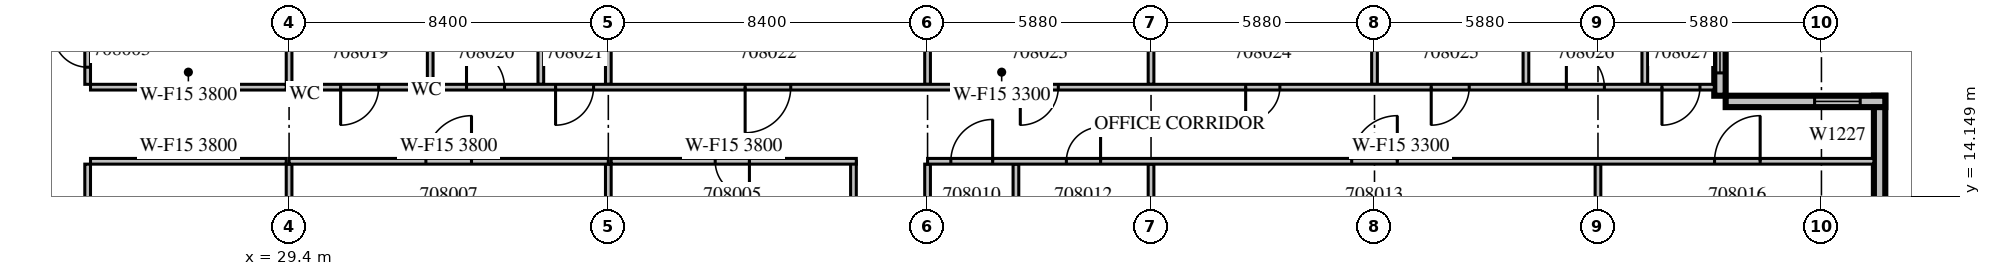
"""IFC4 building model, lengths in metres.
Left out: names, types, materials, properties, quantities, classifications, styles, units other than length and angle.
Written with IfcOpenShell. Run it as: python <this file> out.ifc"""

import sys

from ifc_helpers import new_model, si_unit, direction, frame, frame_2d, origin, place, context, subcontext, project, spatial, rectangle, extrude, source, transform, mapped, element, fill, save


model = new_model("IFC4")
c1 = context("Model", 3, precision=1e-05, world=origin(), true_north=direction((0.0, 1.0)))
c2 = subcontext(c1, "Body", "Model", "MODEL_VIEW")
j1 = project(units=[si_unit("LENGTHUNIT", "METRE"), si_unit("PLANEANGLEUNIT", "RADIAN")], contexts=[c1])
p1 = place(None, origin())
s1 = spatial("IfcSite", under=j1, at=p1, CompositionType="ELEMENT")
p2 = place(p1, origin())
s2 = spatial("IfcBuilding", under=s1, at=p2, CompositionType="ELEMENT")
p3 = place(p2, frame((0.0, 0.0, 44.7)))
s3 = spatial("IfcBuildingStorey", under=s2, at=p3, CompositionType="ELEMENT", Elevation=44.7)
m1 = source(origin(), c2, "Body", "SweptSolid", [
    extrude(rectangle(XDim=6.3, YDim=0.3, at=frame_2d((3.15, 0.0))), origin(), (0.0, 0.0, 1.0), 3.8),
])
p4 = place(p3, frame((71.25, 10.5, 0.0), z_axis=(0.0, 0.0, 1.0), x_axis=(0.0, 1.0, 0.0)))
e1 = element("IfcWall", 1, at=p4, inside=s3, PredefinedType="STANDARD", context=c2, shape_type="MappedRepresentation", body=[
    mapped(m1, transform((0.0, 0.0, 0.0), scale=1.0)),
])
m2 = source(origin(), c2, "Body", "SweptSolid", [
    extrude(rectangle(XDim=1.2, YDim=2.7, at=frame_2d((0.6, 1.35))), frame((0.0, 0.16, 0.0), z_axis=(0.0, -1.0, 0.0), x_axis=(1.0, 0.0, 0.0)), (0.0, 0.0, 1.0), 0.32),
])
p5 = place(p4, frame((1.062, 0.0, 0.6)))
e2 = element("IfcOpeningElement", 2, at=p5, cuts=e1, PredefinedType="OPENING", context=c2, shape_type="MappedRepresentation", body=[
    mapped(m2, transform((0.0, 0.0, 0.0), scale=1.0)),
])
m3 = source(origin(), c2, "Body", "SweptSolid", [
    extrude(rectangle(XDim=4.2, YDim=0.3, at=frame_2d((2.1, 0.0))), origin(), (0.0, 0.0, 1.0), 3.8),
])
p6 = place(p3, frame((71.4, 16.65, 0.0), z_axis=(0.0, 0.0, 1.0), x_axis=(-1.0, 0.0, 0.0)))
e3 = element("IfcWall", 3, at=p6, inside=s3, PredefinedType="STANDARD", context=c2, shape_type="MappedRepresentation", body=[
    mapped(m3, transform((0.0, 0.0, 0.0), scale=1.0)),
])
p7 = place(p6, frame((0.66, 0.0, 0.6)))
e4 = element("IfcOpeningElement", 4, at=p7, cuts=e3, PredefinedType="OPENING", context=c2, shape_type="MappedRepresentation", body=[
    mapped(m2, transform((0.0, 0.0, 0.0), scale=1.0)),
])
p8 = place(p3, frame((67.05, 16.8, 0.0), z_axis=(0.0, 0.0, 1.0), x_axis=(0.0, 1.0, 0.0)))
e5 = element("IfcWall", 5, at=p8, inside=s3, PredefinedType="STANDARD", context=c2, shape_type="MappedRepresentation", body=[
    mapped(m3, transform((0.0, 0.0, 0.0), scale=1.0)),
])
m4 = source(origin(), c2, "Body", "SweptSolid", [
    extrude(rectangle(XDim=3.0, YDim=2.7, at=frame_2d((1.5, 1.35))), frame((0.0, 0.16, 0.0), z_axis=(0.0, -1.0, 0.0), x_axis=(1.0, 0.0, 0.0)), (0.0, 0.0, 1.0), 0.32),
])
p9 = place(p8, frame((0.6, 0.0, 0.6)))
e6 = element("IfcOpeningElement", 6, at=p9, cuts=e5, PredefinedType="OPENING", context=c2, shape_type="MappedRepresentation", body=[
    mapped(m4, transform((0.0, 0.0, 0.0), scale=1.0)),
])
m5 = source(origin(), c2, "Body", "SweptSolid", [
    extrude(rectangle(XDim=11.925, YDim=0.15, at=frame_2d((5.963, 0.0))), origin(), (0.0, 0.0, 1.0), 3.8),
])
p10 = place(p3, frame((24.1, 15.0, 0.0), z_axis=(0.0, 0.0, 1.0), x_axis=(0.0, -1.0, 0.0)))
e7 = element("IfcWall", 7, at=p10, inside=s3, PredefinedType="PARTITIONING", context=c2, shape_type="MappedRepresentation", body=[
    mapped(m5, transform((0.0, 0.0, 0.0), scale=1.0)),
])
m6 = source(origin(), c2, "Body", "SweptSolid", [
    extrude(rectangle(XDim=0.9, YDim=2.1, at=frame_2d((0.45, 1.05))), frame((0.0, 0.085, 0.0), z_axis=(0.0, -1.0, 0.0), x_axis=(1.0, 0.0, 0.0)), (0.0, 0.0, 1.0), 0.17),
])
p11 = place(p10, frame((9.562, 0.0, 0.0)))
e8 = element("IfcOpeningElement", 8, at=p11, cuts=e7, PredefinedType="OPENING", context=c2, shape_type="MappedRepresentation", body=[
    mapped(m6, transform((0.0, 0.0, 0.0), scale=1.0)),
])
p12 = place(p10, frame((2.725, 0.0, 0.0)))
e9 = element("IfcOpeningElement", 9, at=p12, cuts=e7, PredefinedType="OPENING", context=c2, shape_type="MappedRepresentation", body=[
    mapped(m6, transform((0.0, 0.0, 0.0), scale=1.0)),
])
m7 = source(origin(), c2, "Body", "SweptSolid", [
    extrude(rectangle(XDim=3.6, YDim=0.15, at=frame_2d((1.8, 0.0))), origin(), (0.0, 0.0, 1.0), 3.8),
])
p13 = place(p3, frame((24.1, 20.7, 0.0), z_axis=(0.0, 0.0, 1.0), x_axis=(0.0, -1.0, 0.0)))
e10 = element("IfcWall", 10, at=p13, inside=s3, PredefinedType="PARTITIONING", context=c2, shape_type="MappedRepresentation", body=[
    mapped(m7, transform((0.0, 0.0, 0.0), scale=1.0)),
])
p14 = place(p13, frame((2.25, 0.0, 0.0)))
e11 = element("IfcOpeningElement", 11, at=p14, cuts=e10, PredefinedType="OPENING", context=c2, shape_type="MappedRepresentation", body=[
    mapped(m6, transform((0.0, 0.0, 0.0), scale=1.0)),
])
m8 = source(origin(), c2, "Body", "SweptSolid", [
    extrude(rectangle(XDim=5.15, YDim=0.15, at=frame_2d((2.575, 0.0))), origin(), (0.0, 0.0, 1.0), 3.8),
])
for number, where, z_axis, x_axis in (
    (12, (29.325, 15.075, 0.0), (0.0, 0.0, 1.0), (-1.0, 0.0, 0.0)),
    (13, (24.175, 17.025, 0.0), (0.0, 0.0, 1.0), (1.0, 0.0, 0.0)),
):
    element("IfcWall", number, at=place(p3, frame(where, z_axis=z_axis, x_axis=x_axis)), inside=s3, PredefinedType="PARTITIONING", context=c2, shape_type="MappedRepresentation", body=[
        mapped(m8, transform((0.0, 0.0, 0.0), scale=1.0)),
    ])
m9 = source(origin(), c2, "Body", "SweptSolid", [
    extrude(rectangle(XDim=3.901, YDim=0.15, at=frame_2d((1.95, 0.0))), origin(), (0.0, 0.0, 1.0), 3.8),
])
p15 = place(p3, frame((29.4, 11.099, 0.0), z_axis=(0.0, 0.0, 1.0), x_axis=(0.0, 1.0, 0.0)))
e14 = element("IfcWall", 14, at=p15, inside=s3, PredefinedType="PARTITIONING", context=c2, shape_type="MappedRepresentation", body=[
    mapped(m9, transform((0.0, 0.0, 0.0), scale=1.0)),
])
m10 = source(origin(), c2, "Body", "SweptSolid", [
    extrude(rectangle(XDim=2.701, YDim=0.15, at=frame_2d((1.351, 0.0))), origin(), (0.0, 0.0, 1.0), 3.8),
])
p16 = place(p3, frame((29.4, 17.1, 0.0), z_axis=(0.0, 0.0, 1.0), x_axis=(0.0, 1.0, 0.0)))
e15 = element("IfcWall", 15, at=p16, inside=s3, PredefinedType="PARTITIONING", context=c2, shape_type="MappedRepresentation", body=[
    mapped(m10, transform((0.0, 0.0, 0.0), scale=1.0)),
])
m11 = source(origin(), c2, "Body", "SweptSolid", [
    extrude(rectangle(XDim=3.975, YDim=0.15, at=frame_2d((1.988, 0.0))), origin(), (0.0, 0.0, 1.0), 3.8),
])
p17 = place(p3, frame((44.25, 11.1, 0.0), z_axis=(0.0, 0.0, 1.0), x_axis=(0.0, 1.0, 0.0)))
e16 = element("IfcWall", 16, at=p17, inside=s3, PredefinedType="PARTITIONING", context=c2, shape_type="MappedRepresentation", body=[
    mapped(m11, transform((0.0, 0.0, 0.0), scale=1.0)),
])
m12 = source(origin(), c2, "Body", "SweptSolid", [
    extrude(rectangle(XDim=6.45, YDim=0.15, at=frame_2d((3.225, 0.0))), origin(), (0.0, 0.0, 1.0), 3.8),
])
p18 = place(p3, frame((44.325, 15.075, 0.0), z_axis=(0.0, 0.0, 1.0), x_axis=(-1.0, 0.0, 0.0)))
e17 = element("IfcWall", 17, at=p18, inside=s3, PredefinedType="PARTITIONING", context=c2, shape_type="MappedRepresentation", body=[
    mapped(m12, transform((0.0, 0.0, 0.0), scale=1.0)),
])
p19 = place(p18, frame((2.812, 0.0, 0.0)))
e18 = element("IfcOpeningElement", 18, at=p19, cuts=e17, PredefinedType="OPENING", context=c2, shape_type="MappedRepresentation", body=[
    mapped(m6, transform((0.0, 0.0, 0.0), scale=1.0)),
])
m13 = source(origin(), c2, "Body", "SweptSolid", [
    extrude(rectangle(XDim=3.75, YDim=0.15, at=frame_2d((1.875, 0.0))), origin(), (0.0, 0.0, 1.0), 3.8),
])
for number, where, z_axis, x_axis in (
    (19, (37.8, 11.25, 0.0), (0.0, 0.0, 1.0), (0.0, 1.0, 0.0)),
    (20, (48.525, 11.25, 0.0), (0.0, 0.0, 1.0), (0.0, 1.0, 0.0)),
    (21, (46.2, 11.25, 0.0), (0.0, 0.0, 1.0), (0.0, 1.0, 0.0)),
    (22, (52.08, 11.25, 0.0), (0.0, 0.0, 1.0), (0.0, 1.0, 0.0)),
    (23, (63.84, 11.25, 0.0), (0.0, 0.0, 1.0), (0.0, 1.0, 0.0)),
):
    element("IfcWall", number, at=place(p3, frame(where, z_axis=z_axis, x_axis=x_axis)), inside=s3, PredefinedType="PARTITIONING", context=c2, shape_type="MappedRepresentation", body=[
        mapped(m13, transform((0.0, 0.0, 0.0), scale=1.0)),
    ])
for number, where, z_axis, x_axis in (
    (24, (33.113, 20.7, 0.0), (0.0, 0.0, 1.0), (0.0, -1.0, 0.0)),
    (25, (36.024, 20.7, 0.0), (0.0, 0.0, 1.0), (0.0, -1.0, 0.0)),
    (26, (61.944, 20.7, 0.0), (0.0, 0.0, 1.0), (0.0, -1.0, 0.0)),
    (27, (65.072, 20.7, 0.0), (0.0, 0.0, 1.0), (0.0, -1.0, 0.0)),
):
    element("IfcWall", number, at=place(p3, frame(where, z_axis=z_axis, x_axis=x_axis)), inside=s3, PredefinedType="PARTITIONING", context=c2, shape_type="MappedRepresentation", body=[
        mapped(m7, transform((0.0, 0.0, 0.0), scale=1.0)),
    ])
for number, where, z_axis, x_axis in (
    (28, (37.8, 17.1, 0.0), (0.0, 0.0, 1.0), (0.0, 1.0, 0.0)),
    (29, (46.2, 17.1, 0.0), (0.0, 0.0, 1.0), (0.0, 1.0, 0.0)),
    (30, (52.08, 17.1, 0.0), (0.0, 0.0, 1.0), (0.0, 1.0, 0.0)),
    (31, (57.96, 17.1, 0.0), (0.0, 0.0, 1.0), (0.0, 1.0, 0.0)),
):
    element("IfcWall", number, at=place(p3, frame(where, z_axis=z_axis, x_axis=x_axis)), inside=s3, PredefinedType="PARTITIONING", context=c2, shape_type="MappedRepresentation", body=[
        mapped(m10, transform((0.0, 0.0, 0.0), scale=1.0)),
    ])
m14 = source(origin(), c2, "Body", "SweptSolid", [
    extrude(rectangle(XDim=8.4, YDim=0.15, at=frame_2d((4.2, 0.0))), origin(), (0.0, 0.0, 1.0), 3.8),
])
p20 = place(p3, frame((37.8, 15.075, 0.0), z_axis=(0.0, 0.0, 1.0), x_axis=(-1.0, 0.0, 0.0)))
e32 = element("IfcWall", 32, at=p20, inside=s3, PredefinedType="PARTITIONING", context=c2, shape_type="MappedRepresentation", body=[
    mapped(m14, transform((0.0, 0.0, 0.0), scale=1.0)),
])
m15 = source(origin(), c2, "Body", "SweptSolid", [
    extrude(rectangle(XDim=1.2, YDim=2.1, at=frame_2d((0.6, 1.05))), frame((0.0, 0.085, 0.0), z_axis=(0.0, -1.0, 0.0), x_axis=(1.0, 0.0, 0.0)), (0.0, 0.0, 1.0), 0.17),
])
p21 = place(p20, frame((3.6, 0.0, 0.0)))
e33 = element("IfcOpeningElement", 33, at=p21, cuts=e32, PredefinedType="OPENING", context=c2, shape_type="MappedRepresentation", body=[
    mapped(m15, transform((0.0, 0.0, 0.0), scale=1.0)),
])
m16 = source(origin(), c2, "Body", "SweptSolid", [
    extrude(rectangle(XDim=24.9, YDim=0.15, at=frame_2d((12.45, 0.0))), origin(), (0.0, 0.0, 1.0), 3.3),
])
p22 = place(p3, frame((71.1, 15.075, 0.0), z_axis=(0.0, 0.0, 1.0), x_axis=(-1.0, 0.0, 0.0)))
e34 = element("IfcWall", 34, at=p22, inside=s3, PredefinedType="PARTITIONING", context=c2, shape_type="MappedRepresentation", body=[
    mapped(m16, transform((0.0, 0.0, 0.0), scale=1.0)),
])
m17 = source(origin(), c2, "Body", "SweptSolid", [
    extrude(rectangle(XDim=1.1, YDim=2.1, at=frame_2d((0.55, 1.05))), frame((0.0, 0.085, 0.0), z_axis=(0.0, -1.0, 0.0), x_axis=(1.0, 0.0, 0.0)), (0.0, 0.0, 1.0), 0.17),
])
p23 = place(p22, frame((23.188, 0.0, 0.0)))
e35 = element("IfcOpeningElement", 35, at=p23, cuts=e34, PredefinedType="OPENING", context=c2, shape_type="MappedRepresentation", body=[
    mapped(m17, transform((0.0, 0.0, 0.0), scale=1.0)),
])
p24 = place(p22, frame((20.348, 0.0, 0.0)))
e36 = element("IfcOpeningElement", 36, at=p24, cuts=e34, PredefinedType="OPENING", context=c2, shape_type="MappedRepresentation", body=[
    mapped(m6, transform((0.0, 0.0, 0.0), scale=1.0)),
])
p25 = place(p22, frame((12.54, 0.0, 0.0)))
e37 = element("IfcOpeningElement", 37, at=p25, cuts=e34, PredefinedType="OPENING", context=c2, shape_type="MappedRepresentation", body=[
    mapped(m15, transform((0.0, 0.0, 0.0), scale=1.0)),
])
p26 = place(p22, frame((2.993, 0.0, 0.0)))
e38 = element("IfcOpeningElement", 38, at=p26, cuts=e34, PredefinedType="OPENING", context=c2, shape_type="MappedRepresentation", body=[
    mapped(m15, transform((0.0, 0.0, 0.0), scale=1.0)),
])
p27 = place(p3, frame((29.4, 17.025, 0.0), z_axis=(0.0, 0.0, 1.0), x_axis=(1.0, 0.0, 0.0)))
e39 = element("IfcWall", 39, at=p27, inside=s3, PredefinedType="PARTITIONING", context=c2, shape_type="SweptSolid", body=[
    extrude(rectangle(XDim=37.5, YDim=0.15, at=frame_2d((18.75, 0.0))), origin(), (0.0, 0.0, 1.0), 3.3),
])
m18 = source(origin(), c2, "Body", "SweptSolid", [
    extrude(rectangle(XDim=1.0, YDim=2.1, at=frame_2d((0.5, 1.05))), frame((0.0, 0.085, 0.0), z_axis=(0.0, -1.0, 0.0), x_axis=(1.0, 0.0, 0.0)), (0.0, 0.0, 1.0), 0.17),
])
p28 = place(p27, frame((1.357, 0.0, 0.0)))
e40 = element("IfcOpeningElement", 40, at=p28, cuts=e39, PredefinedType="OPENING", context=c2, shape_type="MappedRepresentation", body=[
    mapped(m18, transform((0.0, 0.0, 0.0), scale=1.0)),
])
p29 = place(p27, frame((4.669, 0.0, 0.0)))
e41 = element("IfcOpeningElement", 41, at=p29, cuts=e39, PredefinedType="OPENING", context=c2, shape_type="MappedRepresentation", body=[
    mapped(m18, transform((0.0, 0.0, 0.0), scale=1.0)),
])
p30 = place(p27, frame((7.012, 0.0, 0.0)))
e42 = element("IfcOpeningElement", 42, at=p30, cuts=e39, PredefinedType="OPENING", context=c2, shape_type="MappedRepresentation", body=[
    mapped(m18, transform((0.0, 0.0, 0.0), scale=1.0)),
])
p31 = place(p27, frame((12.0, 0.0, 0.0)))
e43 = element("IfcOpeningElement", 43, at=p31, cuts=e39, PredefinedType="OPENING", context=c2, shape_type="MappedRepresentation", body=[
    mapped(m15, transform((0.0, 0.0, 0.0), scale=1.0)),
])
p32 = place(p27, frame((19.24, 0.0, 0.0)))
e44 = element("IfcOpeningElement", 44, at=p32, cuts=e39, PredefinedType="OPENING", context=c2, shape_type="MappedRepresentation", body=[
    mapped(m18, transform((0.0, 0.0, 0.0), scale=1.0)),
])
p33 = place(p27, frame((25.17, 0.0, 0.0)))
e45 = element("IfcOpeningElement", 45, at=p33, cuts=e39, PredefinedType="OPENING", context=c2, shape_type="MappedRepresentation", body=[
    mapped(m6, transform((0.0, 0.0, 0.0), scale=1.0)),
])
p34 = place(p27, frame((30.052, 0.0, 0.0)))
e46 = element("IfcOpeningElement", 46, at=p34, cuts=e39, PredefinedType="OPENING", context=c2, shape_type="MappedRepresentation", body=[
    mapped(m18, transform((0.0, 0.0, 0.0), scale=1.0)),
])
p35 = place(p27, frame((33.608, 0.0, 0.0)))
e47 = element("IfcOpeningElement", 47, at=p35, cuts=e39, PredefinedType="OPENING", context=c2, shape_type="MappedRepresentation", body=[
    mapped(m18, transform((0.0, 0.0, 0.0), scale=1.0)),
])
p36 = place(p27, frame((36.124, 0.0, 0.0)))
e48 = element("IfcOpeningElement", 48, at=p36, cuts=e39, PredefinedType="OPENING", context=c2, shape_type="MappedRepresentation", body=[
    mapped(m18, transform((0.0, 0.0, 0.0), scale=1.0)),
])
m19 = source(origin(), c2, "Body", "SweptSolid", [
    extrude(rectangle(XDim=1.2, YDim=2.7, at=frame_2d((0.6, 1.35))), frame((0.0, 0.03, 0.0), z_axis=(0.0, -1.0, 0.0), x_axis=(1.0, 0.0, 0.0)), (0.0, 0.0, 1.0), 0.06),
])
p37 = place(p7, origin())
e49 = element("IfcWindow", 49, at=p37, inside=s3, PartitioningType="SINGLE_PANEL", PredefinedType="WINDOW", context=c2, shape_type="MappedRepresentation", body=[
    mapped(m19, transform((0.0, 0.0, 0.0), scale=1.0)),
])
fill(e4, e49)
m20 = source(origin(), c2, "Body", "SweptSolid", [
    extrude(rectangle(XDim=3.0, YDim=2.7, at=frame_2d((1.5, 1.35))), frame((0.0, 0.03, 0.0), z_axis=(0.0, -1.0, 0.0), x_axis=(1.0, 0.0, 0.0)), (0.0, 0.0, 1.0), 0.06),
])
p38 = place(p9, origin())
e50 = element("IfcWindow", 50, at=p38, inside=s3, PartitioningType="SINGLE_PANEL", PredefinedType="WINDOW", context=c2, shape_type="MappedRepresentation", body=[
    mapped(m20, transform((0.0, 0.0, 0.0), scale=1.0)),
])
fill(e6, e50)
m21 = source(origin(), c2, "Body", "SweptSolid", [
    extrude(rectangle(XDim=0.9, YDim=2.1, at=frame_2d((0.45, 1.05))), frame((0.0, 0.025, 0.0), z_axis=(0.0, -1.0, 0.0), x_axis=(1.0, 0.0, 0.0)), (0.0, 0.0, 1.0), 0.05),
])
p39 = place(p14, origin())
e51 = element("IfcDoor", 51, at=p39, inside=s3, OperationType="SINGLE_SWING_RIGHT", PredefinedType="DOOR", context=c2, shape_type="MappedRepresentation", body=[
    mapped(m21, transform((0.0, 0.0, 0.0), scale=1.0)),
])
fill(e11, e51)
p40 = place(p19, origin())
e52 = element("IfcDoor", 52, at=p40, inside=s3, OperationType="SINGLE_SWING_LEFT", PredefinedType="DOOR", context=c2, shape_type="MappedRepresentation", body=[
    mapped(m21, transform((0.0, 0.0, 0.0), scale=1.0)),
])
fill(e18, e52)
m22 = source(origin(), c2, "Body", "SweptSolid", [
    extrude(rectangle(XDim=1.2, YDim=2.1, at=frame_2d((0.6, 1.05))), frame((0.0, 0.025, 0.0), z_axis=(0.0, -1.0, 0.0), x_axis=(1.0, 0.0, 0.0)), (0.0, 0.0, 1.0), 0.05),
])
p41 = place(p21, origin())
e53 = element("IfcDoor", 53, at=p41, inside=s3, OperationType="SINGLE_SWING_RIGHT", PredefinedType="DOOR", context=c2, shape_type="MappedRepresentation", body=[
    mapped(m22, transform((0.0, 0.0, 0.0), scale=1.0)),
])
fill(e33, e53)
m23 = source(origin(), c2, "Body", "SweptSolid", [
    extrude(rectangle(XDim=1.1, YDim=2.1, at=frame_2d((0.55, 1.05))), frame((0.0, 0.025, 0.0), z_axis=(0.0, -1.0, 0.0), x_axis=(1.0, 0.0, 0.0)), (0.0, 0.0, 1.0), 0.05),
])
p42 = place(p23, origin())
e54 = element("IfcDoor", 54, at=p42, inside=s3, OperationType="SINGLE_SWING_RIGHT", PredefinedType="DOOR", context=c2, shape_type="MappedRepresentation", body=[
    mapped(m23, transform((0.0, 0.0, 0.0), scale=1.0)),
])
fill(e35, e54)
p43 = place(p24, origin())
e55 = element("IfcDoor", 55, at=p43, inside=s3, OperationType="SINGLE_SWING_RIGHT", PredefinedType="DOOR", context=c2, shape_type="MappedRepresentation", body=[
    mapped(m21, transform((0.0, 0.0, 0.0), scale=1.0)),
])
fill(e36, e55)
p44 = place(p25, origin())
e56 = element("IfcDoor", 56, at=p44, inside=s3, OperationType="SINGLE_SWING_RIGHT", PredefinedType="DOOR", context=c2, shape_type="MappedRepresentation", body=[
    mapped(m22, transform((0.0, 0.0, 0.0), scale=1.0)),
])
fill(e37, e56)
p45 = place(p26, origin())
e57 = element("IfcDoor", 57, at=p45, inside=s3, OperationType="SINGLE_SWING_RIGHT", PredefinedType="DOOR", context=c2, shape_type="MappedRepresentation", body=[
    mapped(m22, transform((0.0, 0.0, 0.0), scale=1.0)),
])
fill(e38, e57)
m24 = source(origin(), c2, "Body", "SweptSolid", [
    extrude(rectangle(XDim=1.0, YDim=2.1, at=frame_2d((0.5, 1.05))), frame((0.0, 0.025, 0.0), z_axis=(0.0, -1.0, 0.0), x_axis=(1.0, 0.0, 0.0)), (0.0, 0.0, 1.0), 0.05),
])
p46 = place(p28, origin())
e58 = element("IfcDoor", 58, at=p46, inside=s3, OperationType="SINGLE_SWING_RIGHT", PredefinedType="DOOR", context=c2, shape_type="MappedRepresentation", body=[
    mapped(m24, transform((0.0, 0.0, 0.0), scale=1.0)),
])
fill(e40, e58)
p47 = place(p29, origin())
e59 = element("IfcDoor", 59, at=p47, inside=s3, OperationType="SINGLE_SWING_LEFT", PredefinedType="DOOR", context=c2, shape_type="MappedRepresentation", body=[
    mapped(m24, transform((0.0, 0.0, 0.0), scale=1.0)),
])
fill(e41, e59)
p48 = place(p30, origin())
e60 = element("IfcDoor", 60, at=p48, inside=s3, OperationType="SINGLE_SWING_RIGHT", PredefinedType="DOOR", context=c2, shape_type="MappedRepresentation", body=[
    mapped(m24, transform((0.0, 0.0, 0.0), scale=1.0)),
])
fill(e42, e60)
p49 = place(p31, origin())
e61 = element("IfcDoor", 61, at=p49, inside=s3, OperationType="SINGLE_SWING_RIGHT", PredefinedType="DOOR", context=c2, shape_type="MappedRepresentation", body=[
    mapped(m22, transform((0.0, 0.0, 0.0), scale=1.0)),
])
fill(e43, e61)
p50 = place(p32, origin())
e62 = element("IfcDoor", 62, at=p50, inside=s3, OperationType="SINGLE_SWING_RIGHT", PredefinedType="DOOR", context=c2, shape_type="MappedRepresentation", body=[
    mapped(m24, transform((0.0, 0.0, 0.0), scale=1.0)),
])
fill(e44, e62)
p51 = place(p33, origin())
e63 = element("IfcDoor", 63, at=p51, inside=s3, OperationType="SINGLE_SWING_RIGHT", PredefinedType="DOOR", context=c2, shape_type="MappedRepresentation", body=[
    mapped(m21, transform((0.0, 0.0, 0.0), scale=1.0)),
])
fill(e45, e63)
p52 = place(p34, origin())
e64 = element("IfcDoor", 64, at=p52, inside=s3, OperationType="SINGLE_SWING_RIGHT", PredefinedType="DOOR", context=c2, shape_type="MappedRepresentation", body=[
    mapped(m24, transform((0.0, 0.0, 0.0), scale=1.0)),
])
fill(e46, e64)
p53 = place(p35, origin())
e65 = element("IfcDoor", 65, at=p53, inside=s3, OperationType="SINGLE_SWING_LEFT", PredefinedType="DOOR", context=c2, shape_type="MappedRepresentation", body=[
    mapped(m24, transform((0.0, 0.0, 0.0), scale=1.0)),
])
fill(e47, e65)
p54 = place(p36, origin())
e66 = element("IfcDoor", 66, at=p54, inside=s3, OperationType="SINGLE_SWING_RIGHT", PredefinedType="DOOR", context=c2, shape_type="MappedRepresentation", body=[
    mapped(m24, transform((0.0, 0.0, 0.0), scale=1.0)),
])
fill(e48, e66)
save(model, sys.argv[1])
